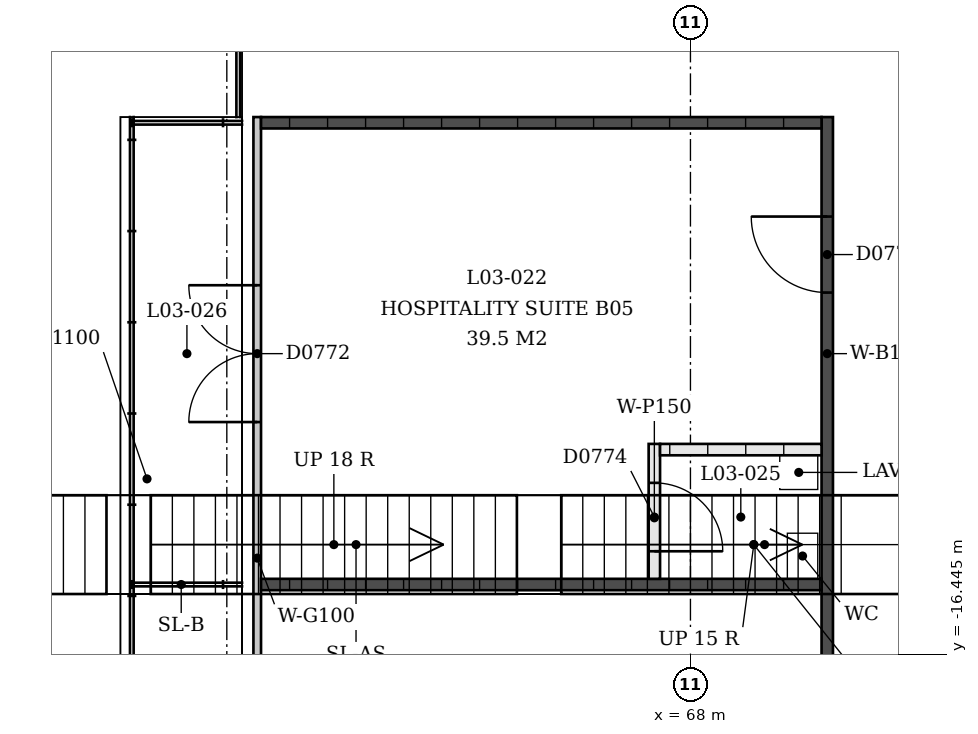
"""IFC4 building model, lengths in metres.
Left out: names, types, materials, properties, quantities, classifications, styles, units other than length and angle.
Written with IfcOpenShell. Run it as: python <this file> out.ifc"""

import sys

from ifc_helpers import new_model, si_unit, direction, frame, frame_2d, origin, place, context, subcontext, project, spatial, rectangle, extrude, element, fill, save


model = new_model("IFC4")
c1 = context("Model", 3, precision=1e-05, world=origin(), true_north=direction((0.0, 1.0)))
c2 = subcontext(c1, "Body", "Model", "MODEL_VIEW")
j1 = project(units=[si_unit("LENGTHUNIT", "METRE"), si_unit("PLANEANGLEUNIT", "RADIAN")], contexts=[c1])
p1 = place(None, origin())
s1 = spatial("IfcSite", under=j1, at=p1, CompositionType="ELEMENT")
p2 = place(p1, origin())
s2 = spatial("IfcBuilding", under=s1, at=p2, CompositionType="ELEMENT")
p3 = place(p2, frame((0.0, 0.0, 13.5)))
s3 = spatial("IfcBuildingStorey", under=s2, at=p3, CompositionType="ELEMENT", Elevation=13.5)
p4 = place(p3, frame((62.3, -22.0, 0.0), z_axis=(0.0, 0.0, 1.0), x_axis=(0.0, 1.0, 0.0)))
e1 = element("IfcWall", 1, at=p4, inside=s3, PredefinedType="PARTITIONING", context=c2, shape_type="SweptSolid", body=[
    extrude(rectangle(XDim=12.625, YDim=0.1, at=frame_2d((6.312, 0.0))), origin(), (0.0, 0.0, 1.0), 3.0),
])
p5 = place(p4, frame((2.538, 0.0, 0.0)))
e2 = element("IfcOpeningElement", 2, at=p5, cuts=e1, PredefinedType="OPENING", context=c2, shape_type="SweptSolid", body=[
    extrude(rectangle(XDim=1.8, YDim=2.1, at=frame_2d((0.9, 1.05))), frame((0.0, 0.05, 0.0), z_axis=(0.0, -1.0, 0.0), x_axis=(1.0, 0.0, 0.0)), (0.0, 0.0, 1.0), 0.1),
])
p6 = place(p4, frame((8.613, 0.0, 0.0)))
e3 = element("IfcOpeningElement", 3, at=p6, cuts=e1, PredefinedType="OPENING", context=c2, shape_type="SweptSolid", body=[
    extrude(rectangle(XDim=1.8, YDim=2.1, at=frame_2d((0.9, 1.05))), frame((0.0, 0.05, 0.0), z_axis=(0.0, -1.0, 0.0), x_axis=(1.0, 0.0, 0.0)), (0.0, 0.0, 1.0), 0.1),
])
p7 = place(p3, frame((69.8, -21.675, 0.0), z_axis=(0.0, 0.0, 1.0), x_axis=(0.0, 1.0, 0.0)))
e4 = element("IfcWall", 4, at=p7, inside=s3, PredefinedType="SOLIDWALL", context=c2, shape_type="SweptSolid", body=[
    extrude(rectangle(XDim=12.3, YDim=0.15, at=frame_2d((6.15, 0.0))), origin(), (0.0, 0.0, 1.0), 3.0),
])
p8 = place(p7, frame((3.916, 0.0, 0.0)))
e5 = element("IfcOpeningElement", 5, at=p8, cuts=e4, PredefinedType="OPENING", context=c2, shape_type="SweptSolid", body=[
    extrude(rectangle(XDim=1.0, YDim=2.1, at=frame_2d((0.5, 1.05))), frame((0.0, 0.075, 0.0), z_axis=(0.0, -1.0, 0.0), x_axis=(1.0, 0.0, 0.0)), (0.0, 0.0, 1.0), 0.15),
])
p9 = place(p7, frame((9.991, 0.0, 0.0)))
e6 = element("IfcOpeningElement", 6, at=p9, cuts=e4, PredefinedType="OPENING", context=c2, shape_type="SweptSolid", body=[
    extrude(rectangle(XDim=1.0, YDim=2.1, at=frame_2d((0.5, 1.05))), frame((0.0, 0.075, 0.0), z_axis=(0.0, -1.0, 0.0), x_axis=(1.0, 0.0, 0.0)), (0.0, 0.0, 1.0), 0.15),
])
for number, where, z_axis, x_axis in (
    (7, (62.35, -15.525, 0.0), (0.0, 0.0, 1.0), (1.0, 0.0, 0.0)),
    (8, (62.35, -9.45, 0.0), (0.0, 0.0, 1.0), (1.0, 0.0, 0.0)),
):
    element("IfcWall", number, at=place(p3, frame(where, z_axis=z_axis, x_axis=x_axis)), inside=s3, PredefinedType="SOLIDWALL", context=c2, shape_type="SweptSolid", body=[
        extrude(rectangle(XDim=7.375, YDim=0.15, at=frame_2d((3.688, 0.0))), origin(), (0.0, 0.0, 1.0), 3.0),
    ])
p10 = place(p3, frame((67.525, -15.45, 0.0), z_axis=(0.0, 0.0, 1.0), x_axis=(0.0, 1.0, 0.0)))
e9 = element("IfcWall", 9, at=p10, inside=s3, PredefinedType="PARTITIONING", context=c2, shape_type="SweptSolid", body=[
    extrude(rectangle(XDim=1.775, YDim=0.15, at=frame_2d((0.887, 0.0))), origin(), (0.0, 0.0, 1.0), 3.0),
])
p11 = place(p10, frame((0.363, 0.0, 0.0)))
e10 = element("IfcOpeningElement", 10, at=p11, cuts=e9, PredefinedType="OPENING", context=c2, shape_type="SweptSolid", body=[
    extrude(rectangle(XDim=0.9, YDim=2.1, at=frame_2d((0.45, 1.05))), frame((0.0, 0.075, 0.0), z_axis=(0.0, -1.0, 0.0), x_axis=(1.0, 0.0, 0.0)), (0.0, 0.0, 1.0), 0.15),
])
p12 = place(p3, frame((67.6, -13.75, 0.0), z_axis=(0.0, 0.0, 1.0), x_axis=(1.0, 0.0, 0.0)))
e11 = element("IfcWall", 11, at=p12, inside=s3, PredefinedType="PARTITIONING", context=c2, shape_type="SweptSolid", body=[
    extrude(rectangle(XDim=2.125, YDim=0.15, at=frame_2d((1.062, 0.0))), origin(), (0.0, 0.0, 1.0), 3.0),
])
p13 = place(p9, origin())
e12 = element("IfcDoor", 12, at=p13, inside=s3, OperationType="SINGLE_SWING_LEFT", PredefinedType="DOOR", context=c2, shape_type="SweptSolid", body=[
    extrude(rectangle(XDim=1.0, YDim=2.1, at=frame_2d((0.5, 1.05))), frame((0.0, 0.025, 0.0), z_axis=(0.0, -1.0, 0.0), x_axis=(1.0, 0.0, 0.0)), (0.0, 0.0, 1.0), 0.05),
])
fill(e6, e12)
p14 = place(p6, origin())
e13 = element("IfcDoor", 13, at=p14, inside=s3, OperationType="DOUBLE_DOOR_SINGLE_SWING", PredefinedType="DOOR", context=c2, shape_type="SweptSolid", body=[
    extrude(rectangle(XDim=1.8, YDim=2.1, at=frame_2d((0.9, 1.05))), frame((0.0, 0.025, 0.0), z_axis=(0.0, -1.0, 0.0), x_axis=(1.0, 0.0, 0.0)), (0.0, 0.0, 1.0), 0.05),
])
fill(e3, e13)
p15 = place(p11, origin())
e14 = element("IfcDoor", 14, at=p15, inside=s3, OperationType="SINGLE_SWING_LEFT", PredefinedType="DOOR", context=c2, shape_type="SweptSolid", body=[
    extrude(rectangle(XDim=0.9, YDim=2.1, at=frame_2d((0.45, 1.05))), frame((0.0, 0.025, 0.0), z_axis=(0.0, -1.0, 0.0), x_axis=(1.0, 0.0, 0.0)), (0.0, 0.0, 1.0), 0.05),
])
fill(e10, e14)
save(model, sys.argv[1])
